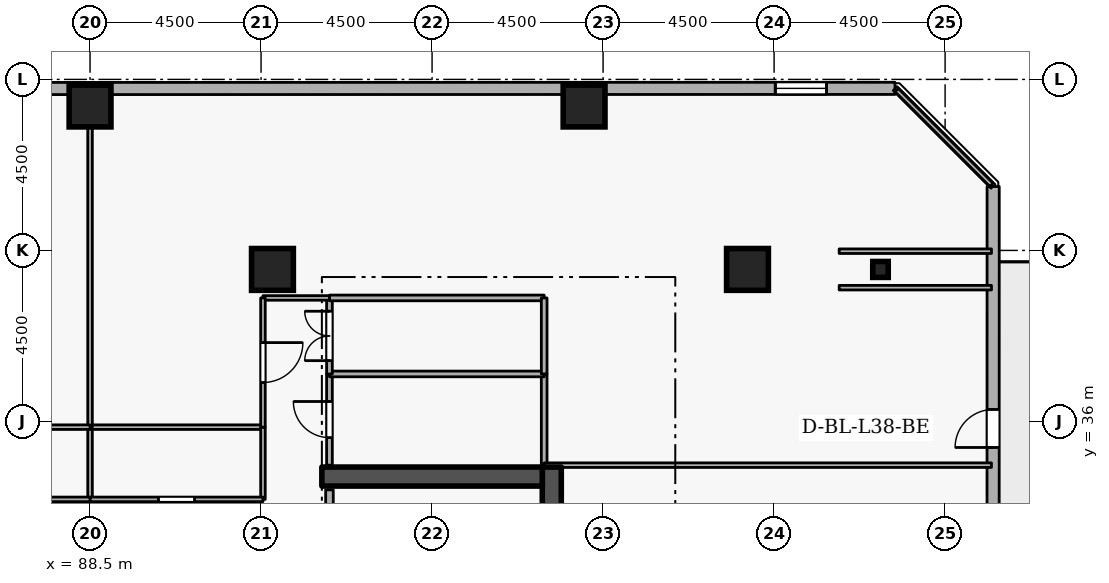
"""IFC4 building model, lengths in metres.
Left out: names, types, materials, properties, quantities, classifications, styles, units other than length and angle.
Written with IfcOpenShell. Run it as: python <this file> out.ifc"""

import sys

from ifc_helpers import new_model, si_unit, direction, frame, frame_2d, origin, origin_2d, place, context, subcontext, project, spatial, rectangle, i_section, extrude, element, fill, save


model = new_model("IFC4")
c1 = context("Model", 3, precision=1e-05, world=origin(), true_north=direction((0.0, 1.0)))
c2 = subcontext(c1, "Body", "Model", "MODEL_VIEW")
j1 = project(units=[si_unit("LENGTHUNIT", "METRE"), si_unit("PLANEANGLEUNIT", "RADIAN")], contexts=[c1])
p1 = place(None, origin())
s1 = spatial("IfcSite", under=j1, at=p1, CompositionType="ELEMENT")
p2 = place(p1, origin())
s2 = spatial("IfcBuilding", under=s1, at=p2, CompositionType="ELEMENT")
p3 = place(p2, frame((0.0, 0.0, 145.5)))
s3 = spatial("IfcBuildingStorey", under=s2, at=p3, CompositionType="ELEMENT", Elevation=145.5)
p4 = place(p3, frame((100.65, 19.2, 0.0), z_axis=(0.0, 0.0, 1.0), x_axis=(0.0, 1.0, 0.0)))
e1 = element("IfcWall", 1, at=p4, inside=s3, PredefinedType="SHEAR", context=c2, shape_type="SweptSolid", body=[
    extrude(rectangle(XDim=15.6, YDim=0.5, at=frame_2d((7.8, 0.0))), origin(), (0.0, 0.0, 1.0), 3.6),
])
p5 = place(p3, frame((94.6, 34.55, 0.0), z_axis=(0.0, 0.0, 1.0), x_axis=(1.0, 0.0, 0.0)))
e2 = element("IfcWall", 2, at=p5, inside=s3, PredefinedType="SHEAR", context=c2, shape_type="SweptSolid", body=[
    extrude(rectangle(XDim=5.8, YDim=0.5, at=frame_2d((2.9, 0.0))), origin(), (0.0, 0.0, 1.0), 3.6),
])
for number, where, z_axis, x_axis in (
    (3, (105.8, 40.0, 0.0), (0.0, 0.0, 1.0), (1.0, 0.0, 0.0)),
    (4, (101.5, 44.3, 0.0), (0.0, 0.0, 1.0), (1.0, 0.0, 0.0)),
    (5, (88.5, 44.3, 0.0), (0.0, 0.0, 1.0), (1.0, 0.0, 0.0)),
    (6, (93.3, 40.0, 0.0), (0.0, 0.0, 1.0), (1.0, 0.0, 0.0)),
):
    element("IfcColumn", number, at=place(p3, frame(where, z_axis=z_axis, x_axis=x_axis)), inside=s3, PredefinedType="COLUMN", context=c2, shape_type="SweptSolid", body=[
        extrude(rectangle(XDim=1.1, YDim=1.1, at=origin_2d()), origin(), (0.0, 0.0, 1.0), 3.6),
    ])
p6 = place(p3, frame((109.3, 40.0, 0.0), z_axis=(0.0, 0.0, 1.0), x_axis=(1.0, 0.0, 0.0)))
e7 = element("IfcColumn", 7, at=p6, inside=s3, PredefinedType="COLUMN", context=c2, shape_type="SweptSolid", body=[
    extrude(i_section(OverallWidth=0.407, OverallDepth=0.419, WebThickness=0.031, FlangeThickness=0.049, FilletRadius=0.015, at=origin_2d()), origin(), (0.0, 0.0, 1.0), 3.6),
])
p7 = place(p3, frame((112.258, 7.749, 0.0), z_axis=(0.0, 0.0, 1.0), x_axis=(0.000184351399, 0.999999983007, 0.0)))
e8 = element("IfcWall", 8, at=p7, inside=s3, PredefinedType="STANDARD", context=c2, shape_type="SweptSolid", body=[
    extrude(rectangle(XDim=34.432, YDim=0.32, at=frame_2d((17.216, 0.0))), origin(), (0.0, 0.0, 1.0), 2.22),
])
p8 = place(p7, frame((27.566, 0.0, 0.0)))
e9 = element("IfcOpeningElement", 9, at=p8, cuts=e8, PredefinedType="OPENING", context=c2, shape_type="SweptSolid", body=[
    extrude(rectangle(XDim=1.0, YDim=2.08, at=frame_2d((0.5, 1.04))), frame((0.0, 0.17, 0.0), z_axis=(0.0, -1.0, 0.0), x_axis=(1.0, 0.0, 0.0)), (0.0, 0.0, 1.0), 0.34),
])
p9 = place(p7, frame((1.8, 0.0, 0.72)))
e10 = element("IfcOpeningElement", 10, at=p9, cuts=e8, PredefinedType="OPENING", context=c2, shape_type="SweptSolid", body=[
    extrude(rectangle(XDim=1.35, YDim=1.05, at=frame_2d((0.675, 0.525))), frame((0.0, 0.17, 0.0), z_axis=(0.0, -1.0, 0.0), x_axis=(1.0, 0.0, 0.0)), (0.0, 0.0, 1.0), 0.34),
])
p10 = place(p7, frame((11.4, 0.0, 0.72)))
e11 = element("IfcOpeningElement", 11, at=p10, cuts=e8, PredefinedType="OPENING", context=c2, shape_type="SweptSolid", body=[
    extrude(rectangle(XDim=1.35, YDim=1.05, at=frame_2d((0.675, 0.525))), frame((0.0, 0.17, 0.0), z_axis=(0.0, -1.0, 0.0), x_axis=(1.0, 0.0, 0.0)), (0.0, 0.0, 1.0), 0.34),
])
p11 = place(p7, frame((16.2, 0.0, 0.72)))
e12 = element("IfcOpeningElement", 12, at=p11, cuts=e8, PredefinedType="OPENING", context=c2, shape_type="SweptSolid", body=[
    extrude(rectangle(XDim=1.35, YDim=1.05, at=frame_2d((0.675, 0.525))), frame((0.0, 0.17, 0.0), z_axis=(0.0, -1.0, 0.0), x_axis=(1.0, 0.0, 0.0)), (0.0, 0.0, 1.0), 0.34),
])
p12 = place(p7, frame((21.0, 0.0, 0.72)))
e13 = element("IfcOpeningElement", 13, at=p12, cuts=e8, PredefinedType="OPENING", context=c2, shape_type="SweptSolid", body=[
    extrude(rectangle(XDim=1.35, YDim=1.05, at=frame_2d((0.675, 0.525))), frame((0.0, 0.17, 0.0), z_axis=(0.0, -1.0, 0.0), x_axis=(1.0, 0.0, 0.0)), (0.0, 0.0, 1.0), 0.34),
])
p13 = place(p3, frame((109.681, 44.765, 0.0), z_axis=(0.0, 0.0, 1.0), x_axis=(-0.999999983007, -0.000184351399, 0.0)))
e14 = element("IfcWall", 14, at=p13, inside=s3, PredefinedType="STANDARD", context=c2, shape_type="SweptSolid", body=[
    extrude(rectangle(XDim=34.432, YDim=0.32, at=frame_2d((17.216, 0.0))), origin(), (0.0, 0.0, 1.0), 2.22),
])
p14 = place(p13, frame((1.8, 0.0, 0.72)))
e15 = element("IfcOpeningElement", 15, at=p14, cuts=e14, PredefinedType="OPENING", context=c2, shape_type="SweptSolid", body=[
    extrude(rectangle(XDim=1.35, YDim=1.05, at=frame_2d((0.675, 0.525))), frame((0.0, 0.17, 0.0), z_axis=(0.0, -1.0, 0.0), x_axis=(1.0, 0.0, 0.0)), (0.0, 0.0, 1.0), 0.34),
])
p15 = place(p3, frame((94.8, 32.0, 0.0), z_axis=(0.0, 0.0, 1.0), x_axis=(0.0, 1.0, 0.0)))
e16 = element("IfcWall", 16, at=p15, inside=s3, PredefinedType="STANDARD", context=c2, shape_type="SweptSolid", body=[
    extrude(rectangle(XDim=2.2, YDim=0.2, at=frame_2d((1.1, 0.0))), origin(), (0.0, 0.0, 1.0), 3.3),
])
p16 = place(p15, frame((0.525, 0.0, 0.0)))
e17 = element("IfcOpeningElement", 17, at=p16, cuts=e16, PredefinedType="OPENING", context=c2, shape_type="SweptSolid", body=[
    extrude(rectangle(XDim=1.15, YDim=2.1, at=frame_2d((0.575, 1.05))), frame((0.0, 0.11, 0.0), z_axis=(0.0, -1.0, 0.0), x_axis=(1.0, 0.0, 0.0)), (0.0, 0.0, 1.0), 0.22),
])
p17 = place(p3, frame((100.45, 37.25, 0.0), z_axis=(0.0, 0.0, 1.0), x_axis=(0.0, -1.0, 0.0)))
e18 = element("IfcWall", 18, at=p17, inside=s3, PredefinedType="PARTITIONING", context=c2, shape_type="SweptSolid", body=[
    extrude(rectangle(XDim=2.4, YDim=0.15, at=frame_2d((1.2, 0.0))), origin(), (0.0, 0.0, 1.0), 3.3),
])
p18 = place(p3, frame((94.8, 34.85, 0.0), z_axis=(0.0, 0.0, 1.0), x_axis=(0.0, 1.0, 0.0)))
e19 = element("IfcWall", 19, at=p18, inside=s3, PredefinedType="PARTITIONING", context=c2, shape_type="SweptSolid", body=[
    extrude(rectangle(XDim=2.4, YDim=0.15, at=frame_2d((1.2, 0.0))), origin(), (0.0, 0.0, 1.0), 3.3),
])
p19 = place(p18, frame((0.725, 0.0, 0.0)))
e20 = element("IfcOpeningElement", 20, at=p19, cuts=e19, PredefinedType="OPENING", context=c2, shape_type="SweptSolid", body=[
    extrude(rectangle(XDim=0.95, YDim=2.1, at=frame_2d((0.475, 1.05))), frame((0.0, 0.085, 0.0), z_axis=(0.0, -1.0, 0.0), x_axis=(1.0, 0.0, 0.0)), (0.0, 0.0, 1.0), 0.17),
])
p20 = place(p3, frame((94.8, 37.25, 0.0), z_axis=(0.0, 0.0, 1.0), x_axis=(1.0, 0.0, 0.0)))
e21 = element("IfcWall", 21, at=p20, inside=s3, PredefinedType="PARTITIONING", context=c2, shape_type="SweptSolid", body=[
    extrude(rectangle(XDim=5.65, YDim=0.15, at=frame_2d((2.825, 0.0))), origin(), (0.0, 0.0, 1.0), 3.3),
])
p21 = place(p3, frame((94.8, 37.25, 0.0), z_axis=(0.0, 0.0, 1.0), x_axis=(0.0, 1.0, 0.0)))
e22 = element("IfcWall", 22, at=p21, inside=s3, PredefinedType="PARTITIONING", context=c2, shape_type="SweptSolid", body=[
    extrude(rectangle(XDim=2.0, YDim=0.15, at=frame_2d((1.0, 0.0))), origin(), (0.0, 0.0, 1.0), 3.3),
])
p22 = place(p21, frame((0.35, 0.0, 0.0)))
e23 = element("IfcOpeningElement", 23, at=p22, cuts=e22, PredefinedType="OPENING", context=c2, shape_type="SweptSolid", body=[
    extrude(rectangle(XDim=1.3, YDim=2.12, at=frame_2d((0.65, 1.06))), frame((0.0, 0.085, 0.0), z_axis=(0.0, -1.0, 0.0), x_axis=(1.0, 0.0, 0.0)), (0.0, 0.0, 1.0), 0.17),
])
p23 = place(p3, frame((94.8, 39.25, 0.0), z_axis=(0.0, 0.0, 1.0), x_axis=(1.0, 0.0, 0.0)))
e24 = element("IfcWall", 24, at=p23, inside=s3, PredefinedType="PARTITIONING", context=c2, shape_type="SweptSolid", body=[
    extrude(rectangle(XDim=5.65, YDim=0.15, at=frame_2d((2.825, 0.0))), origin(), (0.0, 0.0, 1.0), 3.3),
])
p24 = place(p3, frame((100.45, 39.25, 0.0), z_axis=(0.0, 0.0, 1.0), x_axis=(0.0, -1.0, 0.0)))
e25 = element("IfcWall", 25, at=p24, inside=s3, PredefinedType="PARTITIONING", context=c2, shape_type="SweptSolid", body=[
    extrude(rectangle(XDim=2.0, YDim=0.15, at=frame_2d((1.0, 0.0))), origin(), (0.0, 0.0, 1.0), 3.3),
])
p25 = place(p3, frame((88.5, 33.95, 0.0), z_axis=(0.0, 0.0, 1.0), x_axis=(0.0, 1.0, 0.0)))
e26 = element("IfcWall", 26, at=p25, inside=s3, PredefinedType="PARTITIONING", context=c2, shape_type="SweptSolid", body=[
    extrude(rectangle(XDim=1.9, YDim=0.12, at=frame_2d((0.95, 0.0))), origin(), (0.0, 0.0, 1.0), 1.685),
])
p26 = place(p3, frame((88.5, 35.85, 0.0), z_axis=(0.0, 0.0, 1.0), x_axis=(1.0, 0.0, 0.0)))
e27 = element("IfcWall", 27, at=p26, inside=s3, PredefinedType="PARTITIONING", context=c2, shape_type="SweptSolid", body=[
    extrude(rectangle(XDim=4.55, YDim=0.12, at=frame_2d((2.275, 0.0))), origin(), (0.0, 0.0, 1.0), 3.3),
])
p27 = place(p3, frame((93.05, 35.85, 0.0), z_axis=(0.0, 0.0, 1.0), x_axis=(0.0, -1.0, 0.0)))
e28 = element("IfcWall", 28, at=p27, inside=s3, PredefinedType="PARTITIONING", context=c2, shape_type="SweptSolid", body=[
    extrude(rectangle(XDim=1.9, YDim=0.12, at=frame_2d((0.95, 0.0))), origin(), (0.0, 0.0, 1.0), 3.3),
])
p28 = place(p3, frame((93.05, 33.95, 0.0), z_axis=(0.0, 0.0, 1.0), x_axis=(-1.0, 0.0, 0.0)))
e29 = element("IfcWall", 29, at=p28, inside=s3, PredefinedType="PARTITIONING", context=c2, shape_type="SweptSolid", body=[
    extrude(rectangle(XDim=4.55, YDim=0.12, at=frame_2d((2.275, 0.0))), origin(), (0.0, 0.0, 1.0), 3.3),
])
p29 = place(p28, frame((1.8, 0.0, 0.0)))
e30 = element("IfcOpeningElement", 30, at=p29, cuts=e29, PredefinedType="OPENING", context=c2, shape_type="SweptSolid", body=[
    extrude(rectangle(XDim=0.95, YDim=2.1, at=frame_2d((0.475, 1.05))), frame((0.0, 0.07, 0.0), z_axis=(0.0, -1.0, 0.0), x_axis=(1.0, 0.0, 0.0)), (0.0, 0.0, 1.0), 0.14),
])
p30 = place(p3, frame((94.8, 39.25, 0.0), z_axis=(0.0, 0.0, 1.0), x_axis=(-1.0, 0.0, 0.0)))
e31 = element("IfcWall", 31, at=p30, inside=s3, PredefinedType="PARTITIONING", context=c2, shape_type="SweptSolid", body=[
    extrude(rectangle(XDim=1.75, YDim=0.12, at=frame_2d((0.875, 0.0))), origin(), (0.0, 0.0, 1.0), 3.3),
])
p31 = place(p3, frame((93.05, 39.25, 0.0), z_axis=(0.0, 0.0, 1.0), x_axis=(0.0, -1.0, 0.0)))
e32 = element("IfcWall", 32, at=p31, inside=s3, PredefinedType="PARTITIONING", context=c2, shape_type="SweptSolid", body=[
    extrude(rectangle(XDim=3.4, YDim=0.12, at=frame_2d((1.7, 0.0))), origin(), (0.0, 0.0, 1.0), 3.3),
])
p32 = place(p31, frame((1.175, 0.0, 0.0)))
e33 = element("IfcOpeningElement", 33, at=p32, cuts=e32, PredefinedType="OPENING", context=c2, shape_type="SweptSolid", body=[
    extrude(rectangle(XDim=1.05, YDim=2.1, at=frame_2d((0.525, 1.05))), frame((0.0, 0.07, 0.0), z_axis=(0.0, -1.0, 0.0), x_axis=(1.0, 0.0, 0.0)), (0.0, 0.0, 1.0), 0.14),
])
p33 = place(p3, frame((88.5, 35.85, 0.0), z_axis=(0.0, 0.0, 1.0), x_axis=(0.0, 1.0, 0.0)))
e34 = element("IfcWall", 34, at=p33, inside=s3, PredefinedType="PARTITIONING", context=c2, shape_type="SweptSolid", body=[
    extrude(rectangle(XDim=8.87, YDim=0.12, at=frame_2d((4.435, 0.0))), origin(), (0.0, 0.0, 1.0), 1.685),
])
p34 = place(p3, frame((109.725, 44.72, 0.0), z_axis=(0.0, 0.0, 1.0), x_axis=(0.707106781187, -0.707106781187, 0.0)))
e35 = element("IfcWall", 35, at=p34, inside=s3, PredefinedType="PARTITIONING", context=c2, shape_type="SweptSolid", body=[
    extrude(rectangle(XDim=3.528, YDim=0.12, at=frame_2d((1.764, 0.0))), origin(), (0.0, 0.0, 1.0), 3.3),
])
for number, where, z_axis, x_axis in (
    (36, (112.22, 40.48, 0.0), (0.0, 0.0, 1.0), (-1.0, 0.0, 0.0)),
    (37, (108.213, 39.52, 0.0), (0.0, 0.0, 1.0), (1.0, 0.0, 0.0)),
):
    element("IfcWall", number, at=place(p3, frame(where, z_axis=z_axis, x_axis=x_axis)), inside=s3, PredefinedType="PARTITIONING", context=c2, shape_type="SweptSolid", body=[
        extrude(rectangle(XDim=4.007, YDim=0.12, at=frame_2d((2.004, 0.0))), origin(), (0.0, 0.0, 1.0), 1.685),
    ])
p35 = place(p3, frame((112.22, 34.85, 0.0), z_axis=(0.0, 0.0, 1.0), x_axis=(-1.0, 0.0, 0.0)))
e38 = element("IfcWall", 38, at=p35, inside=s3, PredefinedType="PARTITIONING", context=c2, shape_type="SweptSolid", body=[
    extrude(rectangle(XDim=11.77, YDim=0.12, at=frame_2d((5.885, 0.0))), origin(), (0.0, 0.0, 1.0), 2.505),
])
p36 = place(p3, frame((83.95, 35.85, 0.0), z_axis=(0.0, 0.0, 1.0), x_axis=(1.0, 0.0, 0.0)))
e39 = element("IfcWall", 39, at=p36, inside=s3, PredefinedType="PARTITIONING", context=c2, shape_type="SweptSolid", body=[
    extrude(rectangle(XDim=4.55, YDim=0.12, at=frame_2d((2.275, 0.0))), origin(), (0.0, 0.0, 1.0), 3.3),
])
p37 = place(p3, frame((88.5, 33.95, 0.0), z_axis=(0.0, 0.0, 1.0), x_axis=(-1.0, 0.0, 0.0)))
e40 = element("IfcWall", 40, at=p37, inside=s3, PredefinedType="PARTITIONING", context=c2, shape_type="SweptSolid", body=[
    extrude(rectangle(XDim=4.55, YDim=0.12, at=frame_2d((2.275, 0.0))), origin(), (0.0, 0.0, 1.0), 3.3),
])
p38 = place(p37, frame((1.8, 0.0, 0.0)))
e41 = element("IfcOpeningElement", 41, at=p38, cuts=e40, PredefinedType="OPENING", context=c2, shape_type="SweptSolid", body=[
    extrude(rectangle(XDim=0.95, YDim=2.1, at=frame_2d((0.475, 1.05))), frame((0.0, 0.07, 0.0), z_axis=(0.0, -1.0, 0.0), x_axis=(1.0, 0.0, 0.0)), (0.0, 0.0, 1.0), 0.14),
])
p39 = place(p8, origin())
e42 = element("IfcDoor", 42, at=p39, inside=s3, OperationType="SINGLE_SWING_LEFT", PredefinedType="DOOR", context=c2, shape_type="SweptSolid", body=[
    extrude(rectangle(XDim=1.0, YDim=2.08, at=frame_2d((0.5, 1.04))), frame((0.0, 0.025, 0.0), z_axis=(0.0, -1.0, 0.0), x_axis=(1.0, 0.0, 0.0)), (0.0, 0.0, 1.0), 0.05),
])
fill(e9, e42)
p40 = place(p14, origin())
e43 = element("IfcWindow", 43, at=p40, inside=s3, PartitioningType="SINGLE_PANEL", PredefinedType="WINDOW", context=c2, shape_type="SweptSolid", body=[
    extrude(rectangle(XDim=1.35, YDim=1.05, at=frame_2d((0.675, 0.525))), frame((0.0, 0.03, 0.0), z_axis=(0.0, -1.0, 0.0), x_axis=(1.0, 0.0, 0.0)), (0.0, 0.0, 1.0), 0.06),
])
fill(e15, e43)
p41 = place(p19, origin())
e44 = element("IfcDoor", 44, at=p41, inside=s3, OperationType="SINGLE_SWING_RIGHT", PredefinedType="DOOR", context=c2, shape_type="SweptSolid", body=[
    extrude(rectangle(XDim=0.95, YDim=2.1, at=frame_2d((0.475, 1.05))), frame((0.0, 0.025, 0.0), z_axis=(0.0, -1.0, 0.0), x_axis=(1.0, 0.0, 0.0)), (0.0, 0.0, 1.0), 0.05),
])
fill(e20, e44)
p42 = place(p22, origin())
e45 = element("IfcDoor", 45, at=p42, inside=s3, OperationType="DOUBLE_DOOR_SINGLE_SWING", PredefinedType="DOOR", context=c2, shape_type="SweptSolid", body=[
    extrude(rectangle(XDim=1.3, YDim=2.12, at=frame_2d((0.65, 1.06))), frame((0.0, 0.025, 0.0), z_axis=(0.0, -1.0, 0.0), x_axis=(1.0, 0.0, 0.0)), (0.0, 0.0, 1.0), 0.05),
])
fill(e23, e45)
p43 = place(p29, origin())
e46 = element("IfcDoor", 46, at=p43, inside=s3, OperationType="SINGLE_SWING_RIGHT", PredefinedType="DOOR", context=c2, shape_type="SweptSolid", body=[
    extrude(rectangle(XDim=0.95, YDim=2.1, at=frame_2d((0.475, 1.05))), frame((0.0, 0.025, 0.0), z_axis=(0.0, -1.0, 0.0), x_axis=(1.0, 0.0, 0.0)), (0.0, 0.0, 1.0), 0.05),
])
fill(e30, e46)
p44 = place(p32, origin())
e47 = element("IfcDoor", 47, at=p44, inside=s3, OperationType="SINGLE_SWING_LEFT", PredefinedType="DOOR", context=c2, shape_type="SweptSolid", body=[
    extrude(rectangle(XDim=1.05, YDim=2.1, at=frame_2d((0.525, 1.05))), frame((0.0, 0.025, 0.0), z_axis=(0.0, -1.0, 0.0), x_axis=(1.0, 0.0, 0.0)), (0.0, 0.0, 1.0), 0.05),
])
fill(e33, e47)
save(model, sys.argv[1])
